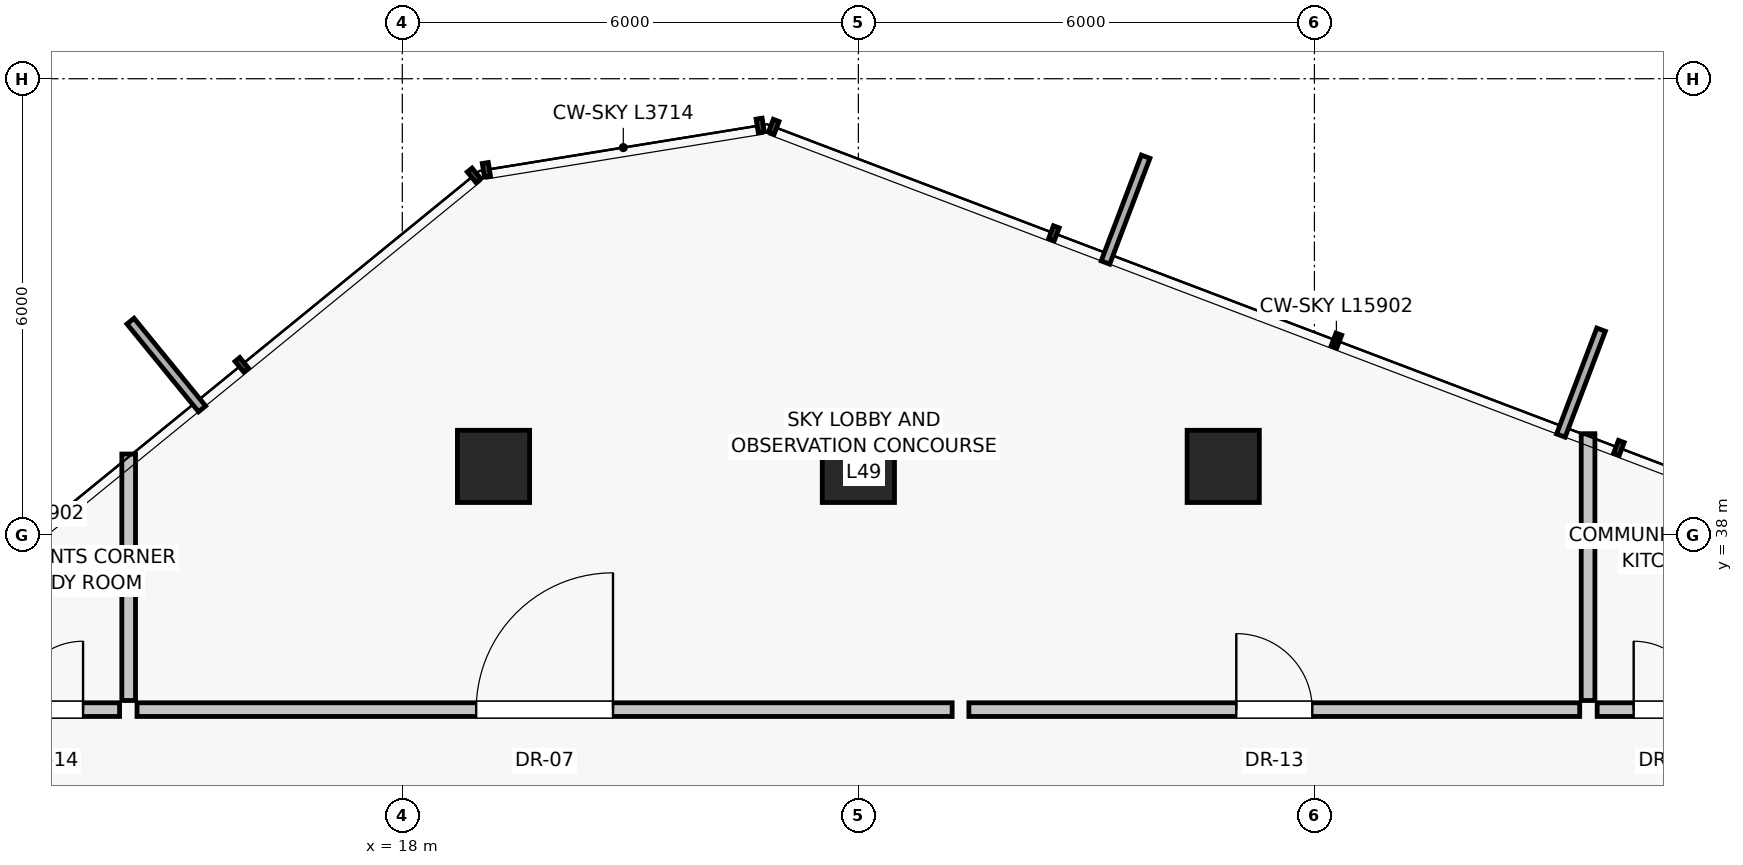
"""IFC4 building model, lengths in metres.
Left out: names, types, materials, properties, quantities, classifications, styles, units other than length and angle.
Written with IfcOpenShell. Run it as: python <this file> out.ifc"""

import sys

from ifc_helpers import new_model, si_unit, direction, frame, frame_2d, origin, origin_2d, place, context, subcontext, project, spatial, rectangle, extrude, source, transform, mapped, element, fill, save


model = new_model("IFC4")
c1 = context("Model", 3, precision=1e-05, world=origin(), true_north=direction((0.0, 1.0)))
c2 = subcontext(c1, "Body", "Model", "MODEL_VIEW")
j1 = project(units=[si_unit("LENGTHUNIT", "METRE"), si_unit("PLANEANGLEUNIT", "RADIAN")], contexts=[c1])
p1 = place(None, origin())
s1 = spatial("IfcSite", under=j1, at=p1, CompositionType="ELEMENT")
p2 = place(p1, origin())
s2 = spatial("IfcBuilding", under=s1, at=p2, CompositionType="ELEMENT")
p3 = place(p2, frame((0.0, 0.0, 174.35)))
s3 = spatial("IfcBuildingStorey", under=s2, at=p3, CompositionType="ELEMENT", Elevation=174.35)
for number, where, z_axis, x_axis in (
    (1, (28.8, 38.9, -0.32), (0.0, 0.0, 1.0), (1.0, 0.0, 0.0)),
    (2, (24.0, 38.9, -0.32), (0.0, 0.0, 1.0), (1.0, 0.0, 0.0)),
    (3, (19.2, 38.9, -0.32), (0.0, 0.0, 1.0), (1.0, 0.0, 0.0)),
):
    element("IfcColumn", number, at=place(p3, frame(where, z_axis=z_axis, x_axis=x_axis)), inside=s3, PredefinedType="COLUMN", context=c2, shape_type="SweptSolid", body=[
        extrude(rectangle(XDim=0.95, YDim=0.95, at=origin_2d()), origin(), (0.0, 0.0, 1.0), 4.82),
    ])
p4 = place(p3, frame((14.4, 35.82, 0.0), z_axis=(0.0, 0.0, 1.0), x_axis=(0.0, 1.0, 0.0)))
e4 = element("IfcWall", 4, at=p4, inside=s3, PredefinedType="PARTITIONING", context=c2, shape_type="SweptSolid", body=[
    extrude(rectangle(XDim=3.243, YDim=0.18, at=frame_2d((1.621, 0.0))), origin(), (0.0, 0.0, 1.0), 4.265),
])
p5 = place(p3, frame((33.6, 35.82, 0.0), z_axis=(0.0, 0.0, 1.0), x_axis=(0.0, 1.0, 0.0)))
e5 = element("IfcWall", 5, at=p5, inside=s3, PredefinedType="PARTITIONING", context=c2, shape_type="SweptSolid", body=[
    extrude(rectangle(XDim=3.51, YDim=0.18, at=frame_2d((1.755, 0.0))), origin(), (0.0, 0.0, 1.0), 4.265),
])
p6 = place(p3, frame((14.51, 35.7, 0.0), z_axis=(0.0, 0.0, 1.0), x_axis=(1.0, 0.0, 0.0)))
e6 = element("IfcWall", 6, at=p6, inside=s3, PredefinedType="PARTITIONING", context=c2, shape_type="SweptSolid", body=[
    extrude(rectangle(XDim=10.724, YDim=0.18, at=frame_2d((5.362, 0.0))), origin(), (0.0, 0.0, 1.0), 4.265),
])
p7 = place(p6, frame((4.462, 0.0, 0.0)))
e7 = element("IfcOpeningElement", 7, at=p7, cuts=e6, PredefinedType="OPENING", context=c2, shape_type="SweptSolid", body=[
    extrude(rectangle(XDim=1.8, YDim=2.25, at=frame_2d((0.9, 1.125))), frame((0.0, 0.1, 0.0), z_axis=(0.0, -1.0, 0.0), x_axis=(1.0, 0.0, 0.0)), (0.0, 0.0, 1.0), 0.2),
])
p8 = place(p3, frame((25.454, 35.7, 0.0), z_axis=(0.0, 0.0, 1.0), x_axis=(1.0, 0.0, 0.0)))
e8 = element("IfcWall", 8, at=p8, inside=s3, PredefinedType="PARTITIONING", context=c2, shape_type="SweptSolid", body=[
    extrude(rectangle(XDim=8.036, YDim=0.18, at=frame_2d((4.018, 0.0))), origin(), (0.0, 0.0, 1.0), 4.265),
])
p9 = place(p8, frame((3.518, 0.0, 0.0)))
e9 = element("IfcOpeningElement", 9, at=p9, cuts=e8, PredefinedType="OPENING", context=c2, shape_type="SweptSolid", body=[
    extrude(rectangle(XDim=1.0, YDim=2.01, at=frame_2d((0.5, 1.005))), frame((0.0, 0.1, 0.0), z_axis=(0.0, -1.0, 0.0), x_axis=(1.0, 0.0, 0.0)), (0.0, 0.0, 1.0), 0.2),
])
p10 = place(p3, frame((12.42, 35.7, 0.0), z_axis=(0.0, 0.0, 1.0), x_axis=(1.0, 0.0, 0.0)))
e10 = element("IfcWall", 10, at=p10, inside=s3, PredefinedType="PARTITIONING", context=c2, shape_type="SweptSolid", body=[
    extrude(rectangle(XDim=1.86, YDim=0.18, at=frame_2d((0.93, 0.0))), origin(), (0.0, 0.0, 1.0), 4.265),
])
p11 = place(p10, frame((0.48, 0.0, 0.0)))
e11 = element("IfcOpeningElement", 11, at=p11, cuts=e10, PredefinedType="OPENING", context=c2, shape_type="SweptSolid", body=[
    extrude(rectangle(XDim=0.9, YDim=2.01, at=frame_2d((0.45, 1.005))), frame((0.0, 0.1, 0.0), z_axis=(0.0, -1.0, 0.0), x_axis=(1.0, 0.0, 0.0)), (0.0, 0.0, 1.0), 0.2),
])
p12 = place(p3, frame((33.72, 35.7, 0.0), z_axis=(0.0, 0.0, 1.0), x_axis=(1.0, 0.0, 0.0)))
e12 = element("IfcWall", 12, at=p12, inside=s3, PredefinedType="PARTITIONING", context=c2, shape_type="SweptSolid", body=[
    extrude(rectangle(XDim=1.86, YDim=0.18, at=frame_2d((0.93, 0.0))), origin(), (0.0, 0.0, 1.0), 4.265),
])
p13 = place(p12, frame((0.48, 0.0, 0.0)))
e13 = element("IfcOpeningElement", 13, at=p13, cuts=e12, PredefinedType="OPENING", context=c2, shape_type="SweptSolid", body=[
    extrude(rectangle(XDim=0.9, YDim=2.01, at=frame_2d((0.45, 1.005))), frame((0.0, 0.1, 0.0), z_axis=(0.0, -1.0, 0.0), x_axis=(1.0, 0.0, 0.0)), (0.0, 0.0, 1.0), 0.2),
])
m1 = source(origin(), c2, "Body", "SweptSolid", [
    extrude(rectangle(XDim=1.8, YDim=2.25, at=frame_2d((0.9, 1.125))), frame((0.0, 0.025, 0.0), z_axis=(0.0, -1.0, 0.0), x_axis=(1.0, 0.0, 0.0)), (0.0, 0.0, 1.0), 0.05),
])
p14 = place(p7, origin())
e14 = element("IfcDoor", 14, at=p14, inside=s3, OperationType="SINGLE_SWING_RIGHT", PredefinedType="DOOR", context=c2, shape_type="MappedRepresentation", body=[
    mapped(m1, transform((0.0, 0.0, 0.0), scale=1.0)),
])
fill(e7, e14)
m2 = source(origin(), c2, "Body", "SweptSolid", [
    extrude(rectangle(XDim=1.0, YDim=2.01, at=frame_2d((0.5, 1.005))), frame((0.0, 0.025, 0.0), z_axis=(0.0, -1.0, 0.0), x_axis=(1.0, 0.0, 0.0)), (0.0, 0.0, 1.0), 0.05),
])
p15 = place(p9, origin())
e15 = element("IfcDoor", 15, at=p15, inside=s3, OperationType="SINGLE_SWING_LEFT", PredefinedType="DOOR", context=c2, shape_type="MappedRepresentation", body=[
    mapped(m2, transform((0.0, 0.0, 0.0), scale=1.0)),
])
fill(e9, e15)
m3 = source(origin(), c2, "Body", "SweptSolid", [
    extrude(rectangle(XDim=0.9, YDim=2.01, at=frame_2d((0.45, 1.005))), frame((0.0, 0.025, 0.0), z_axis=(0.0, -1.0, 0.0), x_axis=(1.0, 0.0, 0.0)), (0.0, 0.0, 1.0), 0.05),
])
p16 = place(p11, origin())
e16 = element("IfcDoor", 16, at=p16, inside=s3, OperationType="SINGLE_SWING_RIGHT", PredefinedType="DOOR", context=c2, shape_type="MappedRepresentation", body=[
    mapped(m3, transform((0.0, 0.0, 0.0), scale=1.0)),
])
fill(e11, e16)
p17 = place(p13, origin())
e17 = element("IfcDoor", 17, at=p17, inside=s3, OperationType="SINGLE_SWING_LEFT", PredefinedType="DOOR", context=c2, shape_type="MappedRepresentation", body=[
    mapped(m3, transform((0.0, 0.0, 0.0), scale=1.0)),
])
fill(e13, e17)
save(model, sys.argv[1])
